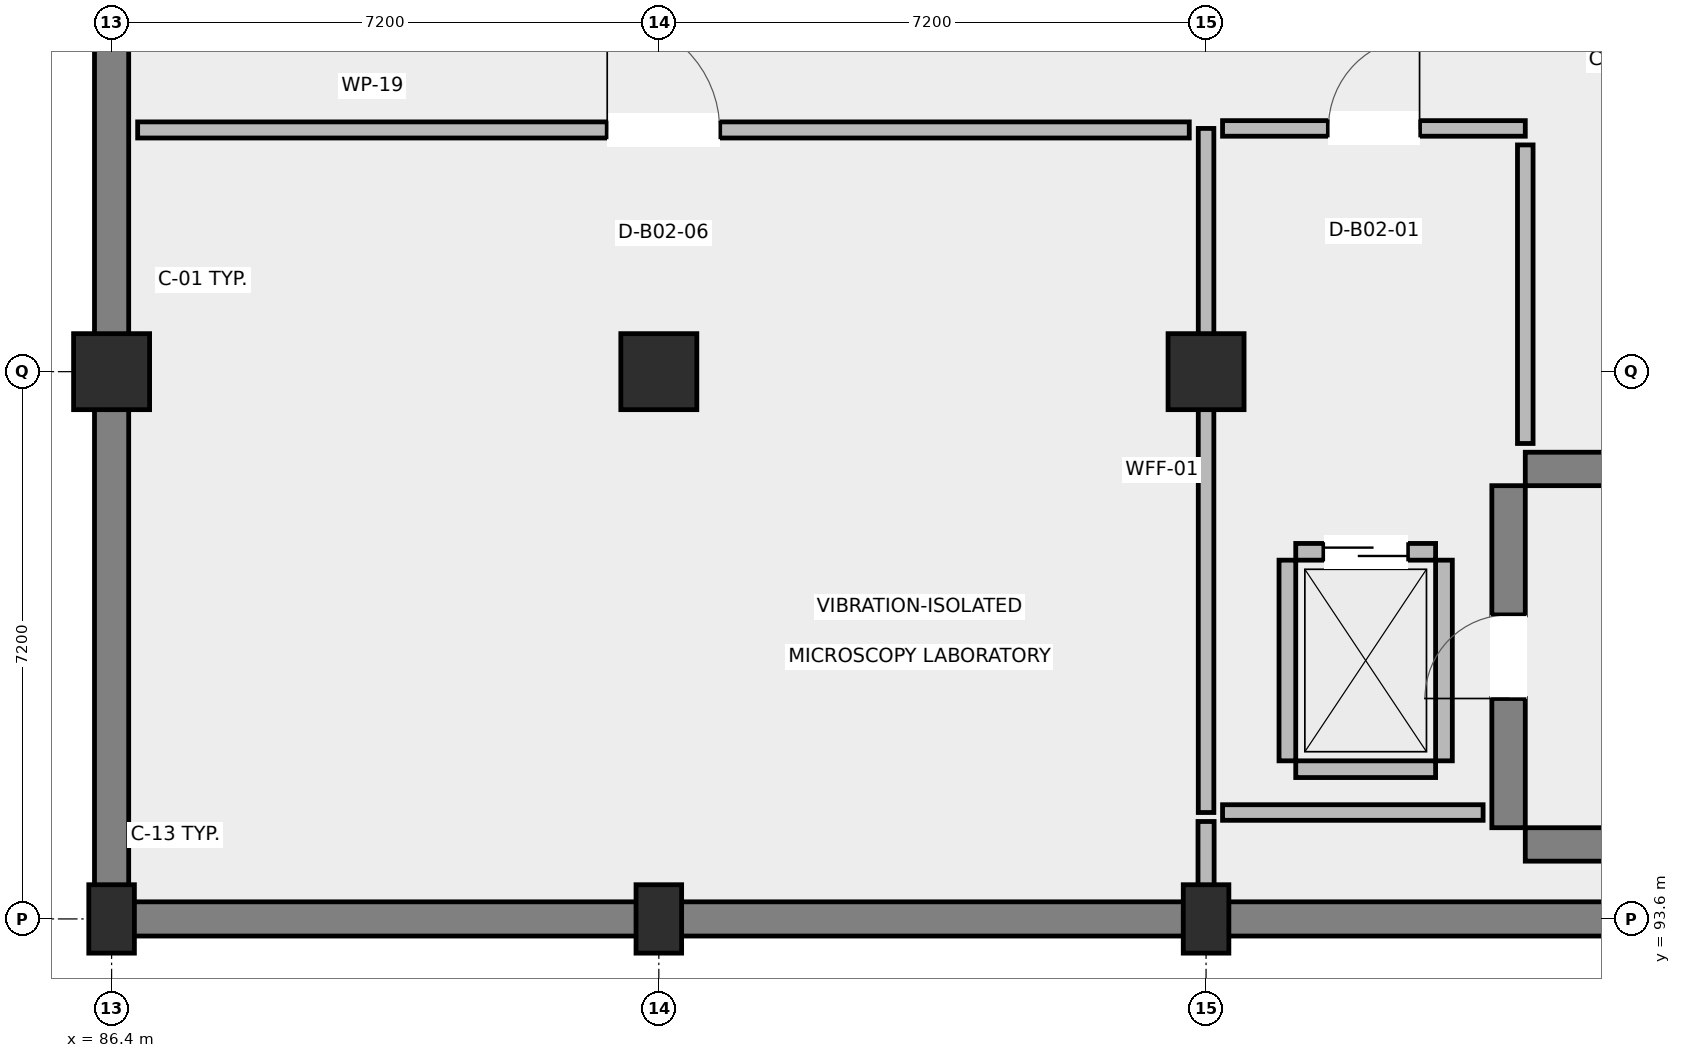
"""IFC4 building model, lengths in metres.
Left out: names, types, materials, properties, quantities, classifications, styles, units other than length and angle.
Written with IfcOpenShell. Run it as: python <this file> out.ifc"""

import sys

from ifc_helpers import new_model, si_unit, direction, frame, frame_2d, origin, origin_2d, place, context, subcontext, project, spatial, rectangle, extrude, element, fill, save


model = new_model("IFC4")
c1 = context("Model", 3, precision=1e-05, world=origin(), true_north=direction((0.0, 1.0)))
c2 = subcontext(c1, "Body", "Model", "MODEL_VIEW")
j1 = project(units=[si_unit("LENGTHUNIT", "METRE"), si_unit("PLANEANGLEUNIT", "RADIAN")], contexts=[c1])
p1 = place(None, origin())
s1 = spatial("IfcSite", under=j1, at=p1, CompositionType="ELEMENT")
p2 = place(p1, origin())
s2 = spatial("IfcBuilding", under=s1, at=p2, CompositionType="ELEMENT")
p3 = place(p2, frame((0.0, 0.0, -9.0)))
s3 = spatial("IfcBuildingStorey", under=s2, at=p3, CompositionType="ELEMENT", Elevation=-9.0)
p4 = place(p3, frame((86.4, 93.6, 0.0), z_axis=(0.0, 0.0, 1.0), x_axis=(1.0, 0.0, 0.0)))
e1 = element("IfcColumn", 1, at=p4, inside=s3, PredefinedType="COLUMN", context=c2, shape_type="SweptSolid", body=[
    extrude(rectangle(XDim=0.6, YDim=0.9, at=origin_2d()), origin(), (0.0, 0.0, 1.0), 4.15),
])
p5 = place(p3, frame((86.4, 100.8, 0.0), z_axis=(0.0, 0.0, 1.0), x_axis=(1.0, 0.0, 0.0)))
e2 = element("IfcColumn", 2, at=p5, inside=s3, PredefinedType="COLUMN", context=c2, shape_type="SweptSolid", body=[
    extrude(rectangle(XDim=1.0, YDim=1.0, at=origin_2d()), origin(), (0.0, 0.0, 1.0), 4.15),
])
p6 = place(p3, frame((93.6, 93.6, 0.0), z_axis=(0.0, 0.0, 1.0), x_axis=(1.0, 0.0, 0.0)))
e3 = element("IfcColumn", 3, at=p6, inside=s3, PredefinedType="COLUMN", context=c2, shape_type="SweptSolid", body=[
    extrude(rectangle(XDim=0.6, YDim=0.9, at=origin_2d()), origin(), (0.0, 0.0, 1.0), 4.15),
])
p7 = place(p3, frame((93.6, 100.8, 0.0), z_axis=(0.0, 0.0, 1.0), x_axis=(1.0, 0.0, 0.0)))
e4 = element("IfcColumn", 4, at=p7, inside=s3, PredefinedType="COLUMN", context=c2, shape_type="SweptSolid", body=[
    extrude(rectangle(XDim=1.0, YDim=1.0, at=origin_2d()), origin(), (0.0, 0.0, 1.0), 4.15),
])
p8 = place(p3, frame((100.8, 93.6, 0.0), z_axis=(0.0, 0.0, 1.0), x_axis=(1.0, 0.0, 0.0)))
e5 = element("IfcColumn", 5, at=p8, inside=s3, PredefinedType="COLUMN", context=c2, shape_type="SweptSolid", body=[
    extrude(rectangle(XDim=0.6, YDim=0.9, at=origin_2d()), origin(), (0.0, 0.0, 1.0), 4.15),
])
p9 = place(p3, frame((100.8, 100.8, 0.0), z_axis=(0.0, 0.0, 1.0), x_axis=(1.0, 0.0, 0.0)))
e6 = element("IfcColumn", 6, at=p9, inside=s3, PredefinedType="COLUMN", context=c2, shape_type="SweptSolid", body=[
    extrude(rectangle(XDim=1.0, YDim=1.0, at=origin_2d()), origin(), (0.0, 0.0, 1.0), 4.15),
])
p10 = place(p3, frame((86.4, 115.2, 0.0), z_axis=(0.0, 0.0, 1.0), x_axis=(0.0, -1.0, 0.0)))
e7 = element("IfcWall", 7, at=p10, inside=s3, PredefinedType="SOLIDWALL", context=c2, shape_type="SweptSolid", body=[
    extrude(rectangle(XDim=21.6, YDim=0.45, at=frame_2d((10.8, 0.0))), origin(), (0.0, 0.0, 1.0), 4.15),
])
p11 = place(p3, frame((86.4, 93.6, 0.0), z_axis=(0.0, 0.0, 1.0), x_axis=(1.0, 0.0, 0.0)))
e8 = element("IfcWall", 8, at=p11, inside=s3, PredefinedType="SOLIDWALL", context=c2, shape_type="SweptSolid", body=[
    extrude(rectangle(XDim=64.8, YDim=0.45, at=frame_2d((32.4, 0.0))), origin(), (0.0, 0.0, 1.0), 4.15),
])
for number, where, z_axis, x_axis in (
    (9, (105.0, 94.58, 0.0), (0.0, 0.0, 1.0), (1.0, 0.0, 0.0)),
    (10, (105.0, 99.52, 0.0), (0.0, 0.0, 1.0), (1.0, 0.0, 0.0)),
):
    element("IfcWall", number, at=place(p3, frame(where, z_axis=z_axis, x_axis=x_axis)), inside=s3, PredefinedType="SHEAR", context=c2, shape_type="SweptSolid", body=[
        extrude(rectangle(XDim=9.5, YDim=0.44, at=frame_2d((4.75, 0.0))), origin(), (0.0, 0.0, 1.0), 4.15),
    ])
p12 = place(p3, frame((104.78, 94.8, 0.0), z_axis=(0.0, 0.0, 1.0), x_axis=(0.0, 1.0, 0.0)))
e11 = element("IfcWall", 11, at=p12, inside=s3, PredefinedType="SHEAR", context=c2, shape_type="SweptSolid", body=[
    extrude(rectangle(XDim=4.5, YDim=0.44, at=frame_2d((2.25, 0.0))), origin(), (0.0, 0.0, 1.0), 4.15),
])
p13 = place(p12, frame((1.7, 0.0, 0.0)))
e12 = element("IfcOpeningElement", 12, at=p13, cuts=e11, PredefinedType="OPENING", context=c2, shape_type="SweptSolid", body=[
    extrude(rectangle(XDim=1.1, YDim=2.15, at=frame_2d((0.55, 1.075))), frame((0.0, 0.23, 0.0), z_axis=(0.0, -1.0, 0.0), x_axis=(1.0, 0.0, 0.0)), (0.0, 0.0, 1.0), 0.46),
])
p14 = place(p3, frame((101.98, 95.57, 0.0), z_axis=(0.0, 0.0, 1.0), x_axis=(1.0, 0.0, 0.0)))
e13 = element("IfcWall", 13, at=p14, inside=s3, PredefinedType="STANDARD", context=c2, shape_type="SweptSolid", body=[
    extrude(rectangle(XDim=1.84, YDim=0.22, at=frame_2d((0.92, 0.0))), origin(), (0.0, 0.0, 1.0), 3.19),
])
p15 = place(p3, frame((101.98, 98.43, 0.0), z_axis=(0.0, 0.0, 1.0), x_axis=(1.0, 0.0, 0.0)))
e14 = element("IfcWall", 14, at=p15, inside=s3, PredefinedType="STANDARD", context=c2, shape_type="SweptSolid", body=[
    extrude(rectangle(XDim=1.84, YDim=0.22, at=frame_2d((0.92, 0.0))), origin(), (0.0, 0.0, 1.0), 3.19),
])
p16 = place(p15, frame((0.37, 0.0, 0.0)))
e15 = element("IfcOpeningElement", 15, at=p16, cuts=e14, PredefinedType="OPENING", context=c2, shape_type="SweptSolid", body=[
    extrude(rectangle(XDim=1.1, YDim=2.15, at=frame_2d((0.55, 1.075))), frame((0.0, 0.12, 0.0), z_axis=(0.0, -1.0, 0.0), x_axis=(1.0, 0.0, 0.0)), (0.0, 0.0, 1.0), 0.24),
])
for number, where, z_axis, x_axis in (
    (16, (101.87, 95.68, 0.0), (0.0, 0.0, 1.0), (0.0, 1.0, 0.0)),
    (17, (103.93, 95.68, 0.0), (0.0, 0.0, 1.0), (0.0, 1.0, 0.0)),
):
    element("IfcWall", number, at=place(p3, frame(where, z_axis=z_axis, x_axis=x_axis)), inside=s3, PredefinedType="STANDARD", context=c2, shape_type="SweptSolid", body=[
        extrude(rectangle(XDim=2.64, YDim=0.22, at=frame_2d((1.32, 0.0))), origin(), (0.0, 0.0, 1.0), 3.19),
    ])
p17 = place(p3, frame((100.8, 95.0, 0.0), z_axis=(0.0, 0.0, 1.0), x_axis=(0.0, 1.0, 0.0)))
e18 = element("IfcWall", 18, at=p17, inside=s3, PredefinedType="PARTITIONING", context=c2, shape_type="SweptSolid", body=[
    extrude(rectangle(XDim=9.0, YDim=0.205, at=frame_2d((4.5, 0.0))), origin(), (0.0, 0.0, 1.0), 3.19),
])
p18 = place(p3, frame((101.017, 104.0, 0.0), z_axis=(0.0, 0.0, 1.0), x_axis=(1.0, 0.0, 0.0)))
e19 = element("IfcWall", 19, at=p18, inside=s3, PredefinedType="PARTITIONING", context=c2, shape_type="SweptSolid", body=[
    extrude(rectangle(XDim=3.983, YDim=0.205, at=frame_2d((1.991, 0.0))), origin(), (0.0, 0.0, 1.0), 3.19),
])
p19 = place(p18, frame((1.392, 0.0, 0.0)))
e20 = element("IfcOpeningElement", 20, at=p19, cuts=e19, PredefinedType="OPENING", context=c2, shape_type="SweptSolid", body=[
    extrude(rectangle(XDim=1.2, YDim=2.15, at=frame_2d((0.6, 1.075))), frame((0.0, 0.113, 0.0), z_axis=(0.0, -1.0, 0.0), x_axis=(1.0, 0.0, 0.0)), (0.0, 0.0, 1.0), 0.225),
])
p20 = place(p3, frame((105.0, 103.783, 0.0), z_axis=(0.0, 0.0, 1.0), x_axis=(0.0, -1.0, 0.0)))
e21 = element("IfcWall", 21, at=p20, inside=s3, PredefinedType="PARTITIONING", context=c2, shape_type="SweptSolid", body=[
    extrude(rectangle(XDim=3.928, YDim=0.205, at=frame_2d((1.964, 0.0))), origin(), (0.0, 0.0, 1.0), 3.19),
])
p21 = place(p3, frame((104.445, 95.0, 0.0), z_axis=(0.0, 0.0, 1.0), x_axis=(-1.0, 0.0, 0.0)))
e22 = element("IfcWall", 22, at=p21, inside=s3, PredefinedType="PARTITIONING", context=c2, shape_type="SweptSolid", body=[
    extrude(rectangle(XDim=3.428, YDim=0.205, at=frame_2d((1.714, 0.0))), origin(), (0.0, 0.0, 1.0), 3.19),
])
p22 = place(p3, frame((86.743, 103.98, 0.0), z_axis=(0.0, 0.0, 1.0), x_axis=(1.0, 0.0, 0.0)))
e23 = element("IfcWall", 23, at=p22, inside=s3, PredefinedType="PARTITIONING", context=c2, shape_type="SweptSolid", body=[
    extrude(rectangle(XDim=13.836, YDim=0.212, at=frame_2d((6.918, 0.0))), origin(), (0.0, 0.0, 1.0), 3.19),
])
p23 = place(p22, frame((6.178, 0.0, 0.0)))
e24 = element("IfcOpeningElement", 24, at=p23, cuts=e23, PredefinedType="OPENING", context=c2, shape_type="SweptSolid", body=[
    extrude(rectangle(XDim=1.48, YDim=2.2, at=frame_2d((0.74, 1.1))), frame((0.0, 0.116, 0.0), z_axis=(0.0, -1.0, 0.0), x_axis=(1.0, 0.0, 0.0)), (0.0, 0.0, 1.0), 0.232),
])
p24 = place(p3, frame((100.8, 94.882, 0.0), z_axis=(0.0, 0.0, 1.0), x_axis=(0.0, -1.0, 0.0)))
e25 = element("IfcWall", 25, at=p24, inside=s3, PredefinedType="PARTITIONING", context=c2, shape_type="SweptSolid", body=[
    extrude(rectangle(XDim=0.939, YDim=0.212, at=frame_2d((0.469, 0.0))), origin(), (0.0, 0.0, 1.0), 3.19),
])
p25 = place(p13, origin())
e26 = element("IfcDoor", 26, at=p25, inside=s3, OperationType="SINGLE_SWING_LEFT", PredefinedType="DOOR", context=c2, shape_type="SweptSolid", body=[
    extrude(rectangle(XDim=1.1, YDim=2.15, at=frame_2d((0.55, 1.075))), frame((0.0, 0.025, 0.0), z_axis=(0.0, -1.0, 0.0), x_axis=(1.0, 0.0, 0.0)), (0.0, 0.0, 1.0), 0.05),
])
fill(e12, e26)
p26 = place(p16, origin())
e27 = element("IfcDoor", 27, at=p26, inside=s3, OperationType="SLIDING_TO_LEFT", PredefinedType="DOOR", context=c2, shape_type="SweptSolid", body=[
    extrude(rectangle(XDim=1.1, YDim=2.15, at=frame_2d((0.55, 1.075))), frame((0.0, 0.025, 0.0), z_axis=(0.0, -1.0, 0.0), x_axis=(1.0, 0.0, 0.0)), (0.0, 0.0, 1.0), 0.05),
])
fill(e15, e27)
p27 = place(p19, origin())
e28 = element("IfcDoor", 28, at=p27, inside=s3, OperationType="SINGLE_SWING_RIGHT", PredefinedType="DOOR", context=c2, shape_type="SweptSolid", body=[
    extrude(rectangle(XDim=1.2, YDim=2.15, at=frame_2d((0.6, 1.075))), frame((0.0, 0.025, 0.0), z_axis=(0.0, -1.0, 0.0), x_axis=(1.0, 0.0, 0.0)), (0.0, 0.0, 1.0), 0.05),
])
fill(e20, e28)
p28 = place(p23, origin())
e29 = element("IfcDoor", 29, at=p28, inside=s3, OperationType="SINGLE_SWING_LEFT", PredefinedType="DOOR", context=c2, shape_type="SweptSolid", body=[
    extrude(rectangle(XDim=1.48, YDim=2.2, at=frame_2d((0.74, 1.1))), frame((0.0, 0.025, 0.0), z_axis=(0.0, -1.0, 0.0), x_axis=(1.0, 0.0, 0.0)), (0.0, 0.0, 1.0), 0.05),
])
fill(e24, e29)
save(model, sys.argv[1])
